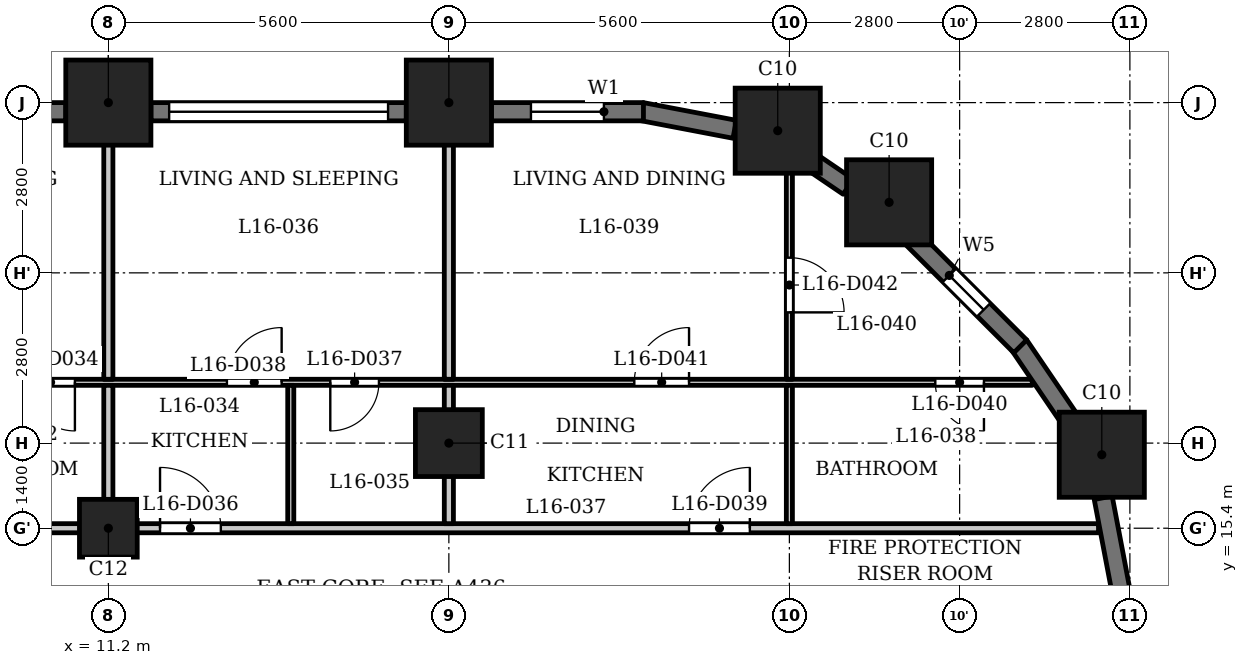
"""IFC4 building model, lengths in metres.
Left out: names, types, materials, properties, quantities, classifications, styles, units other than length and angle.
Written with IfcOpenShell. Run it as: python <this file> out.ifc"""

import sys

from ifc_helpers import new_model, si_unit, direction, frame, frame_2d, origin, origin_2d, place, context, subcontext, project, spatial, rectangle, extrude, element, fill, save


model = new_model("IFC4")
c1 = context("Model", 3, precision=1e-05, world=origin(), true_north=direction((0.0, 1.0)))
c2 = subcontext(c1, "Body", "Model", "MODEL_VIEW")
j1 = project(units=[si_unit("LENGTHUNIT", "METRE"), si_unit("PLANEANGLEUNIT", "RADIAN")], contexts=[c1])
p1 = place(None, origin())
s1 = spatial("IfcSite", under=j1, at=p1, CompositionType="ELEMENT")
p2 = place(p1, origin())
s2 = spatial("IfcBuilding", under=s1, at=p2, CompositionType="ELEMENT")
p3 = place(p2, frame((0.0, 0.0, 65.5)))
s3 = spatial("IfcBuildingStorey", under=s2, at=p3, CompositionType="ELEMENT", Elevation=65.5)
for number, where, z_axis, x_axis in (
    (1, (27.538, 16.609, 0.0), (0.0, 0.0, 1.0), (1.0, 0.0, 0.0)),
    (2, (24.04, 20.76, 0.0), (0.0, 0.0, 1.0), (1.0, 0.0, 0.0)),
    (3, (22.209, 21.938, 0.0), (0.0, 0.0, 1.0), (1.0, 0.0, 0.0)),
    (4, (16.8, 22.4, 0.0), (0.0, 0.0, 1.0), (1.0, 0.0, 0.0)),
    (5, (11.2, 22.4, 0.0), (0.0, 0.0, 1.0), (1.0, 0.0, 0.0)),
):
    element("IfcColumn", number, at=place(p3, frame(where, z_axis=z_axis, x_axis=x_axis)), inside=s3, PredefinedType="COLUMN", context=c2, shape_type="SweptSolid", body=[
        extrude(rectangle(XDim=1.4, YDim=1.4, at=origin_2d()), origin(), (0.0, 0.0, 1.0), 3.5),
    ])
p4 = place(p3, frame((16.8, 16.8, 0.0), z_axis=(0.0, 0.0, 1.0), x_axis=(1.0, 0.0, 0.0)))
e6 = element("IfcColumn", 6, at=p4, inside=s3, PredefinedType="COLUMN", context=c2, shape_type="SweptSolid", body=[
    extrude(rectangle(XDim=1.1, YDim=1.1, at=origin_2d()), origin(), (0.0, 0.0, 1.0), 3.5),
])
p5 = place(p3, frame((11.2, 15.4, 0.0), z_axis=(0.0, 0.0, 1.0), x_axis=(1.0, 0.0, 0.0)))
e7 = element("IfcColumn", 7, at=p5, inside=s3, PredefinedType="COLUMN", context=c2, shape_type="SweptSolid", body=[
    extrude(rectangle(XDim=0.95, YDim=0.95, at=origin_2d()), origin(), (0.0, 0.0, 1.0), 3.5),
])
for number, where, z_axis, x_axis in (
    (8, (27.853, 14.372, 0.0), (0.0, 0.0, 1.0), (-0.187, 0.982, 0.0)),
    (9, (27.053, 17.126, 0.0), (0.0, 0.0, 1.0), (-0.562, 0.827, 0.0)),
):
    element("IfcWall", number, at=place(p3, frame(where, z_axis=z_axis, x_axis=x_axis)), inside=s3, PredefinedType="SOLIDWALL", context=c2, shape_type="SweptSolid", body=[
        extrude(rectangle(XDim=1.556, YDim=0.3, at=frame_2d((0.778, 0.0))), origin(), (0.0, 0.0, 1.0), 2.35),
    ])
p6 = place(p3, frame((26.197, 18.391, 0.0), z_axis=(0.0, 0.0, 1.0), x_axis=(-0.707057949532, 0.707155609469, 0.0)))
e10 = element("IfcWall", 10, at=p6, inside=s3, PredefinedType="SOLIDWALL", context=c2, shape_type="SweptSolid", body=[
    extrude(rectangle(XDim=2.5, YDim=0.3, at=frame_2d((1.25, 0.0))), origin(), (0.0, 0.0, 1.0), 2.35),
])
p7 = place(p6, frame((0.85, 0.0, 0.6)))
e11 = element("IfcOpeningElement", 11, at=p7, cuts=e10, PredefinedType="OPENING", context=c2, shape_type="SweptSolid", body=[
    extrude(rectangle(XDim=0.8, YDim=1.55, at=frame_2d((0.4, 0.775))), frame((0.0, 0.16, 0.0), z_axis=(0.0, -1.0, 0.0), x_axis=(1.0, 0.0, 0.0)), (0.0, 0.0, 1.0), 0.32),
])
p8 = place(p3, frame((23.368, 21.017, 0.0), z_axis=(0.0, 0.0, 1.0), x_axis=(-0.827037530089, 0.562146710232, 0.0)))
e12 = element("IfcWall", 12, at=p8, inside=s3, PredefinedType="SOLIDWALL", context=c2, shape_type="SweptSolid", body=[
    extrude(rectangle(XDim=0.777, YDim=0.3, at=frame_2d((0.388, 0.0))), origin(), (0.0, 0.0, 1.0), 3.2),
])
p9 = place(p3, frame((21.5, 21.961, 0.0), z_axis=(0.0, 0.0, 1.0), x_axis=(-0.982297345734, 0.187328386968, 0.0)))
e13 = element("IfcWall", 13, at=p9, inside=s3, PredefinedType="SOLIDWALL", context=c2, shape_type="SweptSolid", body=[
    extrude(rectangle(XDim=1.556, YDim=0.3, at=frame_2d((0.778, 0.0))), origin(), (0.0, 0.0, 1.0), 2.35),
])
p10 = place(p3, frame((20.0, 22.25, 0.0), z_axis=(0.0, 0.0, 1.0), x_axis=(-1.0, 0.0, 0.0)))
e14 = element("IfcWall", 14, at=p10, inside=s3, PredefinedType="SOLIDWALL", context=c2, shape_type="SweptSolid", body=[
    extrude(rectangle(XDim=2.5, YDim=0.3, at=frame_2d((1.25, 0.0))), origin(), (0.0, 0.0, 1.0), 2.35),
])
p11 = place(p10, frame((0.65, 0.0, 0.6)))
e15 = element("IfcOpeningElement", 15, at=p11, cuts=e14, PredefinedType="OPENING", context=c2, shape_type="SweptSolid", body=[
    extrude(rectangle(XDim=1.2, YDim=1.55, at=frame_2d((0.6, 0.775))), frame((0.0, 0.16, 0.0), z_axis=(0.0, -1.0, 0.0), x_axis=(1.0, 0.0, 0.0)), (0.0, 0.0, 1.0), 0.32),
])
p12 = place(p3, frame((16.1, 22.25, 0.0), z_axis=(0.0, 0.0, 1.0), x_axis=(-1.0, 0.0, 0.0)))
e16 = element("IfcWall", 16, at=p12, inside=s3, PredefinedType="SOLIDWALL", context=c2, shape_type="SweptSolid", body=[
    extrude(rectangle(XDim=4.2, YDim=0.3, at=frame_2d((2.1, 0.0))), origin(), (0.0, 0.0, 1.0), 2.35),
])
p13 = place(p12, frame((0.3, 0.0, 1.2)))
e17 = element("IfcOpeningElement", 17, at=p13, cuts=e16, PredefinedType="OPENING", context=c2, shape_type="SweptSolid", body=[
    extrude(rectangle(XDim=3.6, YDim=0.95, at=frame_2d((1.8, 0.475))), frame((0.0, 0.16, 0.0), z_axis=(0.0, -1.0, 0.0), x_axis=(1.0, 0.0, 0.0)), (0.0, 0.0, 1.0), 0.32),
])
p14 = place(p3, frame((10.5, 22.25, 0.0), z_axis=(0.0, 0.0, 1.0), x_axis=(-1.0, 0.0, 0.0)))
e18 = element("IfcWall", 18, at=p14, inside=s3, PredefinedType="SOLIDWALL", context=c2, shape_type="SweptSolid", body=[
    extrude(rectangle(XDim=4.2, YDim=0.3, at=frame_2d((2.1, 0.0))), origin(), (0.0, 0.0, 1.0), 2.35),
])
p15 = place(p14, frame((0.3, 0.0, 1.2)))
e19 = element("IfcOpeningElement", 19, at=p15, cuts=e18, PredefinedType="OPENING", context=c2, shape_type="SweptSolid", body=[
    extrude(rectangle(XDim=3.6, YDim=0.95, at=frame_2d((1.8, 0.475))), frame((0.0, 0.16, 0.0), z_axis=(0.0, -1.0, 0.0), x_axis=(1.0, 0.0, 0.0)), (0.0, 0.0, 1.0), 0.32),
])
p16 = place(p3, frame((-27.484, 15.4, 0.0), z_axis=(0.0, 0.0, 1.0), x_axis=(1.0, 0.0, 0.0)))
e20 = element("IfcWall", 20, at=p16, inside=s3, PredefinedType="PARTITIONING", context=c2, shape_type="SweptSolid", body=[
    extrude(rectangle(XDim=54.968, YDim=0.15, at=frame_2d((27.484, 0.0))), origin(), (0.0, 0.0, 1.0), 3.2),
])
p17 = place(p16, frame((8.784, 0.0, 0.0)))
e21 = element("IfcOpeningElement", 21, at=p17, cuts=e20, PredefinedType="OPENING", context=c2, shape_type="SweptSolid", body=[
    extrude(rectangle(XDim=1.0, YDim=2.1, at=frame_2d((0.5, 1.05))), frame((0.0, 0.085, 0.0), z_axis=(0.0, -1.0, 0.0), x_axis=(1.0, 0.0, 0.0)), (0.0, 0.0, 1.0), 0.17),
])
p18 = place(p16, frame((14.634, 0.0, 0.0)))
e22 = element("IfcOpeningElement", 22, at=p18, cuts=e20, PredefinedType="OPENING", context=c2, shape_type="SweptSolid", body=[
    extrude(rectangle(XDim=1.0, YDim=2.1, at=frame_2d((0.5, 1.05))), frame((0.0, 0.085, 0.0), z_axis=(0.0, -1.0, 0.0), x_axis=(1.0, 0.0, 0.0)), (0.0, 0.0, 1.0), 0.17),
])
p19 = place(p16, frame((19.484, 0.0, 0.0)))
e23 = element("IfcOpeningElement", 23, at=p19, cuts=e20, PredefinedType="OPENING", context=c2, shape_type="SweptSolid", body=[
    extrude(rectangle(XDim=1.0, YDim=2.1, at=frame_2d((0.5, 1.05))), frame((0.0, 0.085, 0.0), z_axis=(0.0, -1.0, 0.0), x_axis=(1.0, 0.0, 0.0)), (0.0, 0.0, 1.0), 0.17),
])
p20 = place(p16, frame((23.634, 0.0, 0.0)))
e24 = element("IfcOpeningElement", 24, at=p20, cuts=e20, PredefinedType="OPENING", context=c2, shape_type="SweptSolid", body=[
    extrude(rectangle(XDim=1.0, YDim=2.1, at=frame_2d((0.5, 1.05))), frame((0.0, 0.085, 0.0), z_axis=(0.0, -1.0, 0.0), x_axis=(1.0, 0.0, 0.0)), (0.0, 0.0, 1.0), 0.17),
])
p21 = place(p16, frame((28.234, 0.0, 0.0)))
e25 = element("IfcOpeningElement", 25, at=p21, cuts=e20, PredefinedType="OPENING", context=c2, shape_type="SweptSolid", body=[
    extrude(rectangle(XDim=1.0, YDim=2.1, at=frame_2d((0.5, 1.05))), frame((0.0, 0.085, 0.0), z_axis=(0.0, -1.0, 0.0), x_axis=(1.0, 0.0, 0.0)), (0.0, 0.0, 1.0), 0.17),
])
p22 = place(p16, frame((33.784, 0.0, 0.0)))
e26 = element("IfcOpeningElement", 26, at=p22, cuts=e20, PredefinedType="OPENING", context=c2, shape_type="SweptSolid", body=[
    extrude(rectangle(XDim=1.0, YDim=2.1, at=frame_2d((0.5, 1.05))), frame((0.0, 0.085, 0.0), z_axis=(0.0, -1.0, 0.0), x_axis=(1.0, 0.0, 0.0)), (0.0, 0.0, 1.0), 0.17),
])
p23 = place(p16, frame((39.534, 0.0, 0.0)))
e27 = element("IfcOpeningElement", 27, at=p23, cuts=e20, PredefinedType="OPENING", context=c2, shape_type="SweptSolid", body=[
    extrude(rectangle(XDim=1.0, YDim=2.1, at=frame_2d((0.5, 1.05))), frame((0.0, 0.085, 0.0), z_axis=(0.0, -1.0, 0.0), x_axis=(1.0, 0.0, 0.0)), (0.0, 0.0, 1.0), 0.17),
])
p24 = place(p16, frame((48.234, 0.0, 0.0)))
e28 = element("IfcOpeningElement", 28, at=p24, cuts=e20, PredefinedType="OPENING", context=c2, shape_type="SweptSolid", body=[
    extrude(rectangle(XDim=1.0, YDim=2.1, at=frame_2d((0.5, 1.05))), frame((0.0, 0.085, 0.0), z_axis=(0.0, -1.0, 0.0), x_axis=(1.0, 0.0, 0.0)), (0.0, 0.0, 1.0), 0.17),
])
p25 = place(p3, frame((-26.64, 17.8, 0.0), z_axis=(0.0, 0.0, 1.0), x_axis=(1.0, 0.0, 0.0)))
e29 = element("IfcWall", 29, at=p25, inside=s3, PredefinedType="PARTITIONING", context=c2, shape_type="SweptSolid", body=[
    extrude(rectangle(XDim=53.034, YDim=0.1, at=frame_2d((26.517, 0.0))), origin(), (0.0, 0.0, 1.0), 3.2),
])
p26 = place(p25, frame((2.872, 0.0, 0.0)))
e30 = element("IfcOpeningElement", 30, at=p26, cuts=e29, PredefinedType="OPENING", context=c2, shape_type="SweptSolid", body=[
    extrude(rectangle(XDim=0.8, YDim=2.1, at=frame_2d((0.4, 1.05))), frame((0.0, 0.06, 0.0), z_axis=(0.0, -1.0, 0.0), x_axis=(1.0, 0.0, 0.0)), (0.0, 0.0, 1.0), 0.12),
])
p27 = place(p25, frame((7.04, 0.0, 0.0)))
e31 = element("IfcOpeningElement", 31, at=p27, cuts=e29, PredefinedType="OPENING", context=c2, shape_type="SweptSolid", body=[
    extrude(rectangle(XDim=0.9, YDim=2.1, at=frame_2d((0.45, 1.05))), frame((0.0, 0.06, 0.0), z_axis=(0.0, -1.0, 0.0), x_axis=(1.0, 0.0, 0.0)), (0.0, 0.0, 1.0), 0.12),
])
p28 = place(p25, frame((10.74, 0.0, 0.0)))
e32 = element("IfcOpeningElement", 32, at=p28, cuts=e29, PredefinedType="OPENING", context=c2, shape_type="SweptSolid", body=[
    extrude(rectangle(XDim=0.8, YDim=2.1, at=frame_2d((0.4, 1.05))), frame((0.0, 0.06, 0.0), z_axis=(0.0, -1.0, 0.0), x_axis=(1.0, 0.0, 0.0)), (0.0, 0.0, 1.0), 0.12),
])
p29 = place(p25, frame((12.89, 0.0, 0.0)))
e33 = element("IfcOpeningElement", 33, at=p29, cuts=e29, PredefinedType="OPENING", context=c2, shape_type="SweptSolid", body=[
    extrude(rectangle(XDim=0.9, YDim=2.1, at=frame_2d((0.45, 1.05))), frame((0.0, 0.06, 0.0), z_axis=(0.0, -1.0, 0.0), x_axis=(1.0, 0.0, 0.0)), (0.0, 0.0, 1.0), 0.12),
])
p30 = place(p25, frame((16.34, 0.0, 0.0)))
e34 = element("IfcOpeningElement", 34, at=p30, cuts=e29, PredefinedType="OPENING", context=c2, shape_type="SweptSolid", body=[
    extrude(rectangle(XDim=0.8, YDim=2.1, at=frame_2d((0.4, 1.05))), frame((0.0, 0.06, 0.0), z_axis=(0.0, -1.0, 0.0), x_axis=(1.0, 0.0, 0.0)), (0.0, 0.0, 1.0), 0.12),
])
p31 = place(p25, frame((19.74, 0.0, 0.0)))
e35 = element("IfcOpeningElement", 35, at=p31, cuts=e29, PredefinedType="OPENING", context=c2, shape_type="SweptSolid", body=[
    extrude(rectangle(XDim=0.9, YDim=2.1, at=frame_2d((0.45, 1.05))), frame((0.0, 0.06, 0.0), z_axis=(0.0, -1.0, 0.0), x_axis=(1.0, 0.0, 0.0)), (0.0, 0.0, 1.0), 0.12),
])
p32 = place(p25, frame((25.09, 0.0, 0.0)))
e36 = element("IfcOpeningElement", 36, at=p32, cuts=e29, PredefinedType="OPENING", context=c2, shape_type="SweptSolid", body=[
    extrude(rectangle(XDim=0.8, YDim=2.1, at=frame_2d((0.4, 1.05))), frame((0.0, 0.06, 0.0), z_axis=(0.0, -1.0, 0.0), x_axis=(1.0, 0.0, 0.0)), (0.0, 0.0, 1.0), 0.12),
])
p33 = place(p25, frame((21.89, 0.0, 0.0)))
e37 = element("IfcOpeningElement", 37, at=p33, cuts=e29, PredefinedType="OPENING", context=c2, shape_type="SweptSolid", body=[
    extrude(rectangle(XDim=0.9, YDim=2.1, at=frame_2d((0.45, 1.05))), frame((0.0, 0.06, 0.0), z_axis=(0.0, -1.0, 0.0), x_axis=(1.0, 0.0, 0.0)), (0.0, 0.0, 1.0), 0.12),
])
p34 = place(p25, frame((30.69, 0.0, 0.0)))
e38 = element("IfcOpeningElement", 38, at=p34, cuts=e29, PredefinedType="OPENING", context=c2, shape_type="SweptSolid", body=[
    extrude(rectangle(XDim=0.8, YDim=2.1, at=frame_2d((0.4, 1.05))), frame((0.0, 0.06, 0.0), z_axis=(0.0, -1.0, 0.0), x_axis=(1.0, 0.0, 0.0)), (0.0, 0.0, 1.0), 0.12),
])
p35 = place(p25, frame((28.49, 0.0, 0.0)))
e39 = element("IfcOpeningElement", 39, at=p35, cuts=e29, PredefinedType="OPENING", context=c2, shape_type="SweptSolid", body=[
    extrude(rectangle(XDim=0.9, YDim=2.1, at=frame_2d((0.45, 1.05))), frame((0.0, 0.06, 0.0), z_axis=(0.0, -1.0, 0.0), x_axis=(1.0, 0.0, 0.0)), (0.0, 0.0, 1.0), 0.12),
])
p36 = place(p25, frame((36.49, 0.0, 0.0)))
e40 = element("IfcOpeningElement", 40, at=p36, cuts=e29, PredefinedType="OPENING", context=c2, shape_type="SweptSolid", body=[
    extrude(rectangle(XDim=0.8, YDim=2.1, at=frame_2d((0.4, 1.05))), frame((0.0, 0.06, 0.0), z_axis=(0.0, -1.0, 0.0), x_axis=(1.0, 0.0, 0.0)), (0.0, 0.0, 1.0), 0.12),
])
p37 = place(p25, frame((33.04, 0.0, 0.0)))
e41 = element("IfcOpeningElement", 41, at=p37, cuts=e29, PredefinedType="OPENING", context=c2, shape_type="SweptSolid", body=[
    extrude(rectangle(XDim=0.9, YDim=2.1, at=frame_2d((0.45, 1.05))), frame((0.0, 0.06, 0.0), z_axis=(0.0, -1.0, 0.0), x_axis=(1.0, 0.0, 0.0)), (0.0, 0.0, 1.0), 0.12),
])
p38 = place(p25, frame((41.49, 0.0, 0.0)))
e42 = element("IfcOpeningElement", 42, at=p38, cuts=e29, PredefinedType="OPENING", context=c2, shape_type="SweptSolid", body=[
    extrude(rectangle(XDim=0.8, YDim=2.1, at=frame_2d((0.4, 1.05))), frame((0.0, 0.06, 0.0), z_axis=(0.0, -1.0, 0.0), x_axis=(1.0, 0.0, 0.0)), (0.0, 0.0, 1.0), 0.12),
])
p39 = place(p25, frame((39.79, 0.0, 0.0)))
e43 = element("IfcOpeningElement", 43, at=p39, cuts=e29, PredefinedType="OPENING", context=c2, shape_type="SweptSolid", body=[
    extrude(rectangle(XDim=0.9, YDim=2.1, at=frame_2d((0.45, 1.05))), frame((0.0, 0.06, 0.0), z_axis=(0.0, -1.0, 0.0), x_axis=(1.0, 0.0, 0.0)), (0.0, 0.0, 1.0), 0.12),
])
p40 = place(p25, frame((51.44, 0.0, 0.0)))
e44 = element("IfcOpeningElement", 44, at=p40, cuts=e29, PredefinedType="OPENING", context=c2, shape_type="SweptSolid", body=[
    extrude(rectangle(XDim=0.8, YDim=2.1, at=frame_2d((0.4, 1.05))), frame((0.0, 0.06, 0.0), z_axis=(0.0, -1.0, 0.0), x_axis=(1.0, 0.0, 0.0)), (0.0, 0.0, 1.0), 0.12),
])
p41 = place(p25, frame((46.49, 0.0, 0.0)))
e45 = element("IfcOpeningElement", 45, at=p41, cuts=e29, PredefinedType="OPENING", context=c2, shape_type="SweptSolid", body=[
    extrude(rectangle(XDim=0.9, YDim=2.1, at=frame_2d((0.45, 1.05))), frame((0.0, 0.06, 0.0), z_axis=(0.0, -1.0, 0.0), x_axis=(1.0, 0.0, 0.0)), (0.0, 0.0, 1.0), 0.12),
])
p42 = place(p3, frame((11.2, 15.475, 0.0), z_axis=(0.0, 0.0, 1.0), x_axis=(0.0, 1.0, 0.0)))
e46 = element("IfcWall", 46, at=p42, inside=s3, PredefinedType="PARTITIONING", context=c2, shape_type="SweptSolid", body=[
    extrude(rectangle(XDim=2.275, YDim=0.15, at=frame_2d((1.137, 0.0))), origin(), (0.0, 0.0, 1.0), 3.2),
])
p43 = place(p3, frame((11.2, 17.85, 0.0), z_axis=(0.0, 0.0, 1.0), x_axis=(0.0, 1.0, 0.0)))
e47 = element("IfcWall", 47, at=p43, inside=s3, PredefinedType="PARTITIONING", context=c2, shape_type="SweptSolid", body=[
    extrude(rectangle(XDim=5.23, YDim=0.15, at=frame_2d((2.615, 0.0))), origin(), (0.0, 0.0, 1.0), 3.2),
])
p44 = place(p3, frame((14.2, 15.475, 0.0), z_axis=(0.0, 0.0, 1.0), x_axis=(0.0, 1.0, 0.0)))
e48 = element("IfcWall", 48, at=p44, inside=s3, PredefinedType="PARTITIONING", context=c2, shape_type="SweptSolid", body=[
    extrude(rectangle(XDim=2.275, YDim=0.1, at=frame_2d((1.137, 0.0))), origin(), (0.0, 0.0, 1.0), 3.2),
])
p45 = place(p3, frame((16.8, 15.475, 0.0), z_axis=(0.0, 0.0, 1.0), x_axis=(0.0, 1.0, 0.0)))
e49 = element("IfcWall", 49, at=p45, inside=s3, PredefinedType="PARTITIONING", context=c2, shape_type="SweptSolid", body=[
    extrude(rectangle(XDim=2.275, YDim=0.15, at=frame_2d((1.137, 0.0))), origin(), (0.0, 0.0, 1.0), 3.2),
])
p46 = place(p3, frame((16.8, 17.85, 0.0), z_axis=(0.0, 0.0, 1.0), x_axis=(0.0, 1.0, 0.0)))
e50 = element("IfcWall", 50, at=p46, inside=s3, PredefinedType="PARTITIONING", context=c2, shape_type="SweptSolid", body=[
    extrude(rectangle(XDim=5.23, YDim=0.15, at=frame_2d((2.615, 0.0))), origin(), (0.0, 0.0, 1.0), 3.2),
])
p47 = place(p3, frame((22.4, 15.475, 0.0), z_axis=(0.0, 0.0, 1.0), x_axis=(0.0, 1.0, 0.0)))
e51 = element("IfcWall", 51, at=p47, inside=s3, PredefinedType="PARTITIONING", context=c2, shape_type="SweptSolid", body=[
    extrude(rectangle(XDim=2.275, YDim=0.1, at=frame_2d((1.137, 0.0))), origin(), (0.0, 0.0, 1.0), 3.2),
])
p48 = place(p3, frame((22.4, 17.85, 0.0), z_axis=(0.0, 0.0, 1.0), x_axis=(0.0, 1.0, 0.0)))
e52 = element("IfcWall", 52, at=p48, inside=s3, PredefinedType="PARTITIONING", context=c2, shape_type="SweptSolid", body=[
    extrude(rectangle(XDim=3.87, YDim=0.1, at=frame_2d((1.935, 0.0))), origin(), (0.0, 0.0, 1.0), 3.2),
])
p49 = place(p48, frame((1.1, 0.0, 0.0)))
e53 = element("IfcOpeningElement", 53, at=p49, cuts=e52, PredefinedType="OPENING", context=c2, shape_type="SweptSolid", body=[
    extrude(rectangle(XDim=0.9, YDim=2.1, at=frame_2d((0.45, 1.05))), frame((0.0, 0.06, 0.0), z_axis=(0.0, -1.0, 0.0), x_axis=(1.0, 0.0, 0.0)), (0.0, 0.0, 1.0), 0.12),
])
p50 = place(p36, origin())
e54 = element("IfcDoor", 54, at=p50, inside=s3, OperationType="SINGLE_SWING_RIGHT", PredefinedType="DOOR", context=c2, shape_type="SweptSolid", body=[
    extrude(rectangle(XDim=0.8, YDim=2.1, at=frame_2d((0.4, 1.05))), frame((0.0, 0.025, 0.0), z_axis=(0.0, -1.0, 0.0), x_axis=(1.0, 0.0, 0.0)), (0.0, 0.0, 1.0), 0.05),
])
fill(e40, e54)
p51 = place(p23, origin())
e55 = element("IfcDoor", 55, at=p51, inside=s3, OperationType="SINGLE_SWING_RIGHT", PredefinedType="DOOR", context=c2, shape_type="SweptSolid", body=[
    extrude(rectangle(XDim=1.0, YDim=2.1, at=frame_2d((0.5, 1.05))), frame((0.0, 0.025, 0.0), z_axis=(0.0, -1.0, 0.0), x_axis=(1.0, 0.0, 0.0)), (0.0, 0.0, 1.0), 0.05),
])
fill(e27, e55)
p52 = place(p38, origin())
e56 = element("IfcDoor", 56, at=p52, inside=s3, OperationType="SINGLE_SWING_LEFT", PredefinedType="DOOR", context=c2, shape_type="SweptSolid", body=[
    extrude(rectangle(XDim=0.8, YDim=2.1, at=frame_2d((0.4, 1.05))), frame((0.0, 0.025, 0.0), z_axis=(0.0, -1.0, 0.0), x_axis=(1.0, 0.0, 0.0)), (0.0, 0.0, 1.0), 0.05),
])
fill(e42, e56)
p53 = place(p39, origin())
e57 = element("IfcDoor", 57, at=p53, inside=s3, OperationType="SINGLE_SWING_LEFT", PredefinedType="DOOR", context=c2, shape_type="SweptSolid", body=[
    extrude(rectangle(XDim=0.9, YDim=2.1, at=frame_2d((0.45, 1.05))), frame((0.0, 0.025, 0.0), z_axis=(0.0, -1.0, 0.0), x_axis=(1.0, 0.0, 0.0)), (0.0, 0.0, 1.0), 0.05),
])
fill(e43, e57)
p54 = place(p24, origin())
e58 = element("IfcDoor", 58, at=p54, inside=s3, OperationType="SINGLE_SWING_LEFT", PredefinedType="DOOR", context=c2, shape_type="SweptSolid", body=[
    extrude(rectangle(XDim=1.0, YDim=2.1, at=frame_2d((0.5, 1.05))), frame((0.0, 0.025, 0.0), z_axis=(0.0, -1.0, 0.0), x_axis=(1.0, 0.0, 0.0)), (0.0, 0.0, 1.0), 0.05),
])
fill(e28, e58)
p55 = place(p40, origin())
e59 = element("IfcDoor", 59, at=p55, inside=s3, OperationType="SINGLE_SWING_RIGHT", PredefinedType="DOOR", context=c2, shape_type="SweptSolid", body=[
    extrude(rectangle(XDim=0.8, YDim=2.1, at=frame_2d((0.4, 1.05))), frame((0.0, 0.025, 0.0), z_axis=(0.0, -1.0, 0.0), x_axis=(1.0, 0.0, 0.0)), (0.0, 0.0, 1.0), 0.05),
])
fill(e44, e59)
p56 = place(p41, origin())
e60 = element("IfcDoor", 60, at=p56, inside=s3, OperationType="SINGLE_SWING_LEFT", PredefinedType="DOOR", context=c2, shape_type="SweptSolid", body=[
    extrude(rectangle(XDim=0.9, YDim=2.1, at=frame_2d((0.45, 1.05))), frame((0.0, 0.025, 0.0), z_axis=(0.0, -1.0, 0.0), x_axis=(1.0, 0.0, 0.0)), (0.0, 0.0, 1.0), 0.05),
])
fill(e45, e60)
p57 = place(p49, origin())
e61 = element("IfcDoor", 61, at=p57, inside=s3, OperationType="SINGLE_SWING_LEFT", PredefinedType="DOOR", context=c2, shape_type="SweptSolid", body=[
    extrude(rectangle(XDim=0.9, YDim=2.1, at=frame_2d((0.45, 1.05))), frame((0.0, 0.025, 0.0), z_axis=(0.0, -1.0, 0.0), x_axis=(1.0, 0.0, 0.0)), (0.0, 0.0, 1.0), 0.05),
])
fill(e53, e61)
p58 = place(p7, origin())
e62 = element("IfcWindow", 62, at=p58, inside=s3, PartitioningType="SINGLE_PANEL", PredefinedType="WINDOW", context=c2, shape_type="SweptSolid", body=[
    extrude(rectangle(XDim=0.8, YDim=1.55, at=frame_2d((0.4, 0.775))), frame((0.0, 0.03, 0.0), z_axis=(0.0, -1.0, 0.0), x_axis=(1.0, 0.0, 0.0)), (0.0, 0.0, 1.0), 0.06),
])
fill(e11, e62)
p59 = place(p11, origin())
e63 = element("IfcWindow", 63, at=p59, inside=s3, PartitioningType="SINGLE_PANEL", PredefinedType="WINDOW", context=c2, shape_type="SweptSolid", body=[
    extrude(rectangle(XDim=1.2, YDim=1.55, at=frame_2d((0.6, 0.775))), frame((0.0, 0.03, 0.0), z_axis=(0.0, -1.0, 0.0), x_axis=(1.0, 0.0, 0.0)), (0.0, 0.0, 1.0), 0.06),
])
fill(e15, e63)
p60 = place(p13, origin())
e64 = element("IfcWindow", 64, at=p60, inside=s3, PartitioningType="SINGLE_PANEL", PredefinedType="WINDOW", context=c2, shape_type="SweptSolid", body=[
    extrude(rectangle(XDim=3.6, YDim=0.95, at=frame_2d((1.8, 0.475))), frame((0.0, 0.03, 0.0), z_axis=(0.0, -1.0, 0.0), x_axis=(1.0, 0.0, 0.0)), (0.0, 0.0, 1.0), 0.06),
])
fill(e17, e64)
save(model, sys.argv[1])
